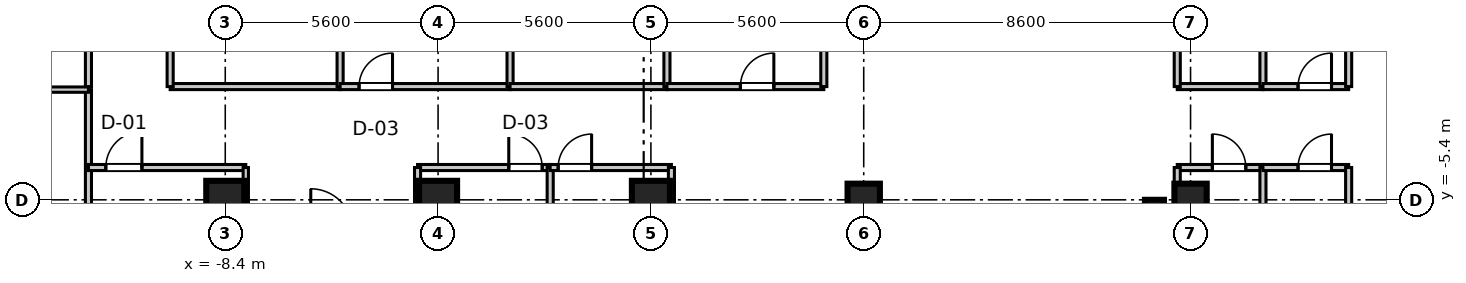
"""IFC4 building model, lengths in metres.
Left out: names, types, materials, properties, quantities, classifications, styles, units other than length and angle.
Written with IfcOpenShell. Run it as: python <this file> out.ifc"""

import sys

from ifc_helpers import new_model, si_unit, direction, frame, frame_2d, origin, origin_2d, place, context, subcontext, project, spatial, rectangle, extrude, source, transform, mapped, element, fill, save


model = new_model("IFC4")
c1 = context("Model", 3, precision=1e-05, world=origin(), true_north=direction((0.0, 1.0)))
c2 = subcontext(c1, "Body", "Model", "MODEL_VIEW")
j1 = project(units=[si_unit("LENGTHUNIT", "METRE"), si_unit("PLANEANGLEUNIT", "RADIAN")], contexts=[c1])
p1 = place(None, origin())
s1 = spatial("IfcSite", under=j1, at=p1, CompositionType="ELEMENT")
p2 = place(p1, origin())
s2 = spatial("IfcBuilding", under=s1, at=p2, CompositionType="ELEMENT")
p3 = place(p2, frame((0.0, 0.0, 241.9)))
s3 = spatial("IfcBuildingStorey", under=s2, at=p3, CompositionType="ELEMENT", Elevation=241.9)
m1 = source(origin(), c2, "Body", "SweptSolid", [
    extrude(rectangle(XDim=1.0, YDim=1.0, at=origin_2d()), origin(), (0.0, 0.0, 1.0), 3.655),
])
for number, where, z_axis, x_axis in (
    (1, (-8.4, -5.4, 0.0), (0.0, 0.0, 1.0), (1.0, 0.0, 0.0)),
    (2, (-2.8, -5.4, 0.0), (0.0, 0.0, 1.0), (1.0, 0.0, 0.0)),
    (3, (2.8, -5.4, 0.0), (0.0, 0.0, 1.0), (1.0, 0.0, 0.0)),
):
    element("IfcColumn", number, at=place(p3, frame(where, z_axis=z_axis, x_axis=x_axis)), inside=s3, PredefinedType="COLUMN", context=c2, shape_type="MappedRepresentation", body=[
        mapped(m1, transform((0.0, 0.0, 0.0), scale=1.0)),
    ])
m2 = source(origin(), c2, "Body", "SweptSolid", [
    extrude(rectangle(XDim=0.85, YDim=0.85, at=origin_2d()), origin(), (0.0, 0.0, 1.0), 3.655),
])
for number, where, z_axis, x_axis in (
    (4, (8.4, -5.4, 0.0), (0.0, 0.0, 1.0), (1.0, 0.0, 0.0)),
    (5, (17.0, -5.4, 0.0), (0.0, 0.0, 1.0), (1.0, 0.0, 0.0)),
):
    element("IfcColumn", number, at=place(p3, frame(where, z_axis=z_axis, x_axis=x_axis)), inside=s3, PredefinedType="PILASTER", context=c2, shape_type="MappedRepresentation", body=[
        mapped(m2, transform((0.0, 0.0, 0.0), scale=1.0)),
    ])
m3 = source(origin(), c2, "Body", "SweptSolid", [
    extrude(rectangle(XDim=11.6, YDim=0.5, at=frame_2d((5.8, 0.0))), origin(), (0.0, 0.0, 1.0), 3.41),
])
p4 = place(p3, frame((16.05, -17.0, 0.0), z_axis=(0.0, 0.0, 1.0), x_axis=(0.0, 1.0, 0.0)))
e6 = element("IfcWall", 6, at=p4, inside=s3, PredefinedType="SHEAR", context=c2, shape_type="MappedRepresentation", body=[
    mapped(m3, transform((0.0, 0.0, 0.0), scale=1.0)),
])
m4 = source(origin(), c2, "Body", "SweptSolid", [
    extrude(rectangle(XDim=2.255, YDim=0.16, at=frame_2d((1.127, 0.0))), origin(), (0.0, 0.0, 1.0), 2.75),
])
p5 = place(p3, frame((16.65, -4.55, 0.0), z_axis=(0.0, 0.0, 1.0), x_axis=(1.0, 0.0, 0.0)))
e7 = element("IfcWall", 7, at=p5, inside=s3, PredefinedType="PARTITIONING", context=c2, shape_type="MappedRepresentation", body=[
    mapped(m4, transform((0.0, 0.0, 0.0), scale=1.0)),
])
p6 = place(p5, frame((0.924, 0.0, 0.0)))
e8 = element("IfcOpeningElement", 8, at=p6, cuts=e7, PredefinedType="OPENING", context=c2, shape_type="SweptSolid", body=[
    extrude(rectangle(XDim=0.88, YDim=2.1, at=frame_2d((0.44, 1.05))), frame((0.0, 0.09, 0.0), z_axis=(0.0, -1.0, 0.0), x_axis=(1.0, 0.0, 0.0)), (0.0, 0.0, 1.0), 0.18),
])
m5 = source(origin(), c2, "Body", "SweptSolid", [
    extrude(rectangle(XDim=19.35, YDim=0.16, at=frame_2d((9.675, 0.0))), origin(), (0.0, 0.0, 1.0), 2.75),
])
for number, where, z_axis, x_axis in (
    (9, (16.65, -23.9, 0.0), (0.0, 0.0, 1.0), (0.0, 1.0, 0.0)),
    (10, (18.905, -23.9, 0.0), (0.0, 0.0, 1.0), (0.0, 1.0, 0.0)),
):
    element("IfcWall", number, at=place(p3, frame(where, z_axis=z_axis, x_axis=x_axis)), inside=s3, PredefinedType="PARTITIONING", context=c2, shape_type="MappedRepresentation", body=[
        mapped(m5, transform((0.0, 0.0, 0.0), scale=1.0)),
    ])
m6 = source(origin(), c2, "Body", "SweptSolid", [
    extrude(rectangle(XDim=2.255, YDim=0.16, at=frame_2d((1.127, 0.0))), origin(), (0.0, 0.0, 1.0), 2.75),
])
p7 = place(p3, frame((18.905, -4.55, 0.0), z_axis=(0.0, 0.0, 1.0), x_axis=(1.0, 0.0, 0.0)))
e11 = element("IfcWall", 11, at=p7, inside=s3, PredefinedType="PARTITIONING", context=c2, shape_type="MappedRepresentation", body=[
    mapped(m6, transform((0.0, 0.0, 0.0), scale=1.0)),
])
p8 = place(p7, frame((0.924, 0.0, 0.0)))
e12 = element("IfcOpeningElement", 12, at=p8, cuts=e11, PredefinedType="OPENING", context=c2, shape_type="SweptSolid", body=[
    extrude(rectangle(XDim=0.88, YDim=2.1, at=frame_2d((0.44, 1.05))), frame((0.0, 0.09, 0.0), z_axis=(0.0, -1.0, 0.0), x_axis=(1.0, 0.0, 0.0)), (0.0, 0.0, 1.0), 0.18),
])
m7 = source(origin(), c2, "Body", "SweptSolid", [
    extrude(rectangle(XDim=17.93, YDim=0.16, at=frame_2d((8.965, 0.0))), origin(), (0.0, 0.0, 1.0), 2.75),
])
p9 = place(p3, frame((21.16, -22.48, 0.0), z_axis=(0.0, 0.0, 1.0), x_axis=(0.0, 1.0, 0.0)))
e13 = element("IfcWall", 13, at=p9, inside=s3, PredefinedType="PARTITIONING", context=c2, shape_type="MappedRepresentation", body=[
    mapped(m7, transform((0.0, 0.0, 0.0), scale=1.0)),
])
m8 = source(origin(), c2, "Body", "SweptSolid", [
    extrude(rectangle(XDim=21.4, YDim=0.16, at=frame_2d((10.7, 0.0))), origin(), (0.0, 0.0, 1.0), 2.75),
])
p10 = place(p3, frame((-12.0, -23.9, 0.0), z_axis=(0.0, 0.0, 1.0), x_axis=(0.0, 1.0, 0.0)))
e14 = element("IfcWall", 14, at=p10, inside=s3, PredefinedType="PARTITIONING", context=c2, shape_type="MappedRepresentation", body=[
    mapped(m8, transform((0.0, 0.0, 0.0), scale=1.0)),
])
p11 = place(p10, frame((12.3, 0.0, 0.0)))
e15 = element("IfcOpeningElement", 15, at=p11, cuts=e14, PredefinedType="OPENING", context=c2, shape_type="SweptSolid", body=[
    extrude(rectangle(XDim=0.95, YDim=2.1, at=frame_2d((0.475, 1.05))), frame((0.0, 0.09, 0.0), z_axis=(0.0, -1.0, 0.0), x_axis=(1.0, 0.0, 0.0)), (0.0, 0.0, 1.0), 0.18),
])
m9 = source(origin(), c2, "Body", "SweptSolid", [
    extrude(rectangle(XDim=9.16, YDim=0.14, at=frame_2d((4.58, 0.0))), origin(), (0.0, 0.0, 1.0), 2.75),
])
p12 = place(p3, frame((-21.16, -2.5, 0.0), z_axis=(0.0, 0.0, 1.0), x_axis=(1.0, 0.0, 0.0)))
e16 = element("IfcWall", 16, at=p12, inside=s3, PredefinedType="PARTITIONING", context=c2, shape_type="MappedRepresentation", body=[
    mapped(m9, transform((0.0, 0.0, 0.0), scale=1.0)),
])
m10 = source(origin(), c2, "Body", "SweptSolid", [
    extrude(rectangle(XDim=4.14, YDim=0.16, at=frame_2d((2.07, 0.0))), origin(), (0.0, 0.0, 1.0), 2.75),
])
p13 = place(p3, frame((-12.0, -4.55, 0.0), z_axis=(0.0, 0.0, 1.0), x_axis=(1.0, 0.0, 0.0)))
e17 = element("IfcWall", 17, at=p13, inside=s3, PredefinedType="PARTITIONING", context=c2, shape_type="MappedRepresentation", body=[
    mapped(m10, transform((0.0, 0.0, 0.0), scale=1.0)),
])
p14 = place(p13, frame((0.457, 0.0, 0.0)))
e18 = element("IfcOpeningElement", 18, at=p14, cuts=e17, PredefinedType="OPENING", context=c2, shape_type="SweptSolid", body=[
    extrude(rectangle(XDim=0.95, YDim=2.1, at=frame_2d((0.475, 1.05))), frame((0.0, 0.09, 0.0), z_axis=(0.0, -1.0, 0.0), x_axis=(1.0, 0.0, 0.0)), (0.0, 0.0, 1.0), 0.18),
])
m11 = source(origin(), c2, "Body", "SweptSolid", [
    extrude(rectangle(XDim=19.35, YDim=0.14, at=frame_2d((9.675, 0.0))), origin(), (0.0, 0.0, 1.0), 2.75),
])
p15 = place(p3, frame((-7.86, -23.9, 0.0), z_axis=(0.0, 0.0, 1.0), x_axis=(0.0, 1.0, 0.0)))
e19 = element("IfcWall", 19, at=p15, inside=s3, PredefinedType="PARTITIONING", context=c2, shape_type="MappedRepresentation", body=[
    mapped(m11, transform((0.0, 0.0, 0.0), scale=1.0)),
])
m12 = source(origin(), c2, "Body", "SweptSolid", [
    extrude(rectangle(XDim=3.49, YDim=0.16, at=frame_2d((1.745, 0.0))), origin(), (0.0, 0.0, 1.0), 2.75),
])
p16 = place(p3, frame((-3.34, -4.55, 0.0), z_axis=(0.0, 0.0, 1.0), x_axis=(1.0, 0.0, 0.0)))
e20 = element("IfcWall", 20, at=p16, inside=s3, PredefinedType="PARTITIONING", context=c2, shape_type="MappedRepresentation", body=[
    mapped(m12, transform((0.0, 0.0, 0.0), scale=1.0)),
])
p17 = place(p16, frame((2.4, 0.0, 0.0)))
e21 = element("IfcOpeningElement", 21, at=p17, cuts=e20, PredefinedType="OPENING", context=c2, shape_type="SweptSolid", body=[
    extrude(rectangle(XDim=0.88, YDim=2.1, at=frame_2d((0.44, 1.05))), frame((0.0, 0.09, 0.0), z_axis=(0.0, -1.0, 0.0), x_axis=(1.0, 0.0, 0.0)), (0.0, 0.0, 1.0), 0.18),
])
for number, where, z_axis, x_axis in (
    (22, (-3.34, -23.9, 0.0), (0.0, 0.0, 1.0), (0.0, 1.0, 0.0)),
    (23, (0.15, -23.9, 0.0), (0.0, 0.0, 1.0), (0.0, 1.0, 0.0)),
):
    element("IfcWall", number, at=place(p3, frame(where, z_axis=z_axis, x_axis=x_axis)), inside=s3, PredefinedType="PARTITIONING", context=c2, shape_type="MappedRepresentation", body=[
        mapped(m5, transform((0.0, 0.0, 0.0), scale=1.0)),
    ])
m13 = source(origin(), c2, "Body", "SweptSolid", [
    extrude(rectangle(XDim=3.19, YDim=0.16, at=frame_2d((1.595, 0.0))), origin(), (0.0, 0.0, 1.0), 2.75),
])
p18 = place(p3, frame((0.15, -4.55, 0.0), z_axis=(0.0, 0.0, 1.0), x_axis=(1.0, 0.0, 0.0)))
e24 = element("IfcWall", 24, at=p18, inside=s3, PredefinedType="PARTITIONING", context=c2, shape_type="MappedRepresentation", body=[
    mapped(m13, transform((0.0, 0.0, 0.0), scale=1.0)),
])
p19 = place(p18, frame((0.21, 0.0, 0.0)))
e25 = element("IfcOpeningElement", 25, at=p19, cuts=e24, PredefinedType="OPENING", context=c2, shape_type="SweptSolid", body=[
    extrude(rectangle(XDim=0.88, YDim=2.1, at=frame_2d((0.44, 1.05))), frame((0.0, 0.09, 0.0), z_axis=(0.0, -1.0, 0.0), x_axis=(1.0, 0.0, 0.0)), (0.0, 0.0, 1.0), 0.18),
])
p20 = place(p3, frame((3.34, -23.9, 0.0), z_axis=(0.0, 0.0, 1.0), x_axis=(0.0, 1.0, 0.0)))
e26 = element("IfcWall", 26, at=p20, inside=s3, PredefinedType="PARTITIONING", context=c2, shape_type="MappedRepresentation", body=[
    mapped(m5, transform((0.0, 0.0, 0.0), scale=1.0)),
])
m14 = source(origin(), c2, "Body", "SweptSolid", [
    extrude(rectangle(XDim=4.84, YDim=0.16, at=frame_2d((2.42, 0.0))), origin(), (0.0, 0.0, 1.0), 2.75),
])
p21 = place(p3, frame((-12.0, -2.42, 0.0), z_axis=(0.0, 0.0, 1.0), x_axis=(0.0, 1.0, 0.0)))
e27 = element("IfcWall", 27, at=p21, inside=s3, PredefinedType="PARTITIONING", context=c2, shape_type="MappedRepresentation", body=[
    mapped(m14, transform((0.0, 0.0, 0.0), scale=1.0)),
])
p22 = place(p21, frame((1.945, 0.0, 0.0)))
e28 = element("IfcOpeningElement", 28, at=p22, cuts=e27, PredefinedType="OPENING", context=c2, shape_type="SweptSolid", body=[
    extrude(rectangle(XDim=0.95, YDim=2.1, at=frame_2d((0.475, 1.05))), frame((0.0, 0.09, 0.0), z_axis=(0.0, -1.0, 0.0), x_axis=(1.0, 0.0, 0.0)), (0.0, 0.0, 1.0), 0.18),
])
m15 = source(origin(), c2, "Body", "SweptSolid", [
    extrude(rectangle(XDim=4.472, YDim=0.16, at=frame_2d((2.236, 0.0))), origin(), (0.0, 0.0, 1.0), 2.75),
])
p23 = place(p3, frame((-9.85, -2.42, 0.0), z_axis=(0.0, 0.0, 1.0), x_axis=(1.0, 0.0, 0.0)))
e29 = element("IfcWall", 29, at=p23, inside=s3, PredefinedType="PARTITIONING", context=c2, shape_type="MappedRepresentation", body=[
    mapped(m15, transform((0.0, 0.0, 0.0), scale=1.0)),
])
for number, where, z_axis, x_axis in (
    (30, (-9.85, -2.42, 0.0), (0.0, 0.0, 1.0), (0.0, 1.0, 0.0)),
    (31, (-5.378, -2.42, 0.0), (0.0, 0.0, 1.0), (0.0, 1.0, 0.0)),
):
    element("IfcWall", number, at=place(p3, frame(where, z_axis=z_axis, x_axis=x_axis)), inside=s3, PredefinedType="PARTITIONING", context=c2, shape_type="MappedRepresentation", body=[
        mapped(m14, transform((0.0, 0.0, 0.0), scale=1.0)),
    ])
m16 = source(origin(), c2, "Body", "SweptSolid", [
    extrude(rectangle(XDim=4.472, YDim=0.16, at=frame_2d((2.236, 0.0))), origin(), (0.0, 0.0, 1.0), 2.75),
])
p24 = place(p3, frame((-5.378, -2.42, 0.0), z_axis=(0.0, 0.0, 1.0), x_axis=(1.0, 0.0, 0.0)))
e32 = element("IfcWall", 32, at=p24, inside=s3, PredefinedType="PARTITIONING", context=c2, shape_type="MappedRepresentation", body=[
    mapped(m16, transform((0.0, 0.0, 0.0), scale=1.0)),
])
p25 = place(p24, frame((0.499, 0.0, 0.0)))
e33 = element("IfcOpeningElement", 33, at=p25, cuts=e32, PredefinedType="OPENING", context=c2, shape_type="SweptSolid", body=[
    extrude(rectangle(XDim=0.88, YDim=2.1, at=frame_2d((0.44, 1.05))), frame((0.0, 0.09, 0.0), z_axis=(0.0, -1.0, 0.0), x_axis=(1.0, 0.0, 0.0)), (0.0, 0.0, 1.0), 0.18),
])
p26 = place(p3, frame((-0.906, -2.42, 0.0), z_axis=(0.0, 0.0, 1.0), x_axis=(0.0, 1.0, 0.0)))
e34 = element("IfcWall", 34, at=p26, inside=s3, PredefinedType="PARTITIONING", context=c2, shape_type="MappedRepresentation", body=[
    mapped(m14, transform((0.0, 0.0, 0.0), scale=1.0)),
])
m17 = source(origin(), c2, "Body", "SweptSolid", [
    extrude(rectangle(XDim=4.128, YDim=0.16, at=frame_2d((2.064, 0.0))), origin(), (0.0, 0.0, 1.0), 2.75),
])
p27 = place(p3, frame((-0.906, -2.42, 0.0), z_axis=(0.0, 0.0, 1.0), x_axis=(1.0, 0.0, 0.0)))
e35 = element("IfcWall", 35, at=p27, inside=s3, PredefinedType="PARTITIONING", context=c2, shape_type="MappedRepresentation", body=[
    mapped(m17, transform((0.0, 0.0, 0.0), scale=1.0)),
])
p28 = place(p3, frame((3.222, -2.42, 0.0), z_axis=(0.0, 0.0, 1.0), x_axis=(0.0, 1.0, 0.0)))
e36 = element("IfcWall", 36, at=p28, inside=s3, PredefinedType="PARTITIONING", context=c2, shape_type="MappedRepresentation", body=[
    mapped(m14, transform((0.0, 0.0, 0.0), scale=1.0)),
])
m18 = source(origin(), c2, "Body", "SweptSolid", [
    extrude(rectangle(XDim=4.128, YDim=0.16, at=frame_2d((2.064, 0.0))), origin(), (0.0, 0.0, 1.0), 2.75),
])
p29 = place(p3, frame((3.222, -2.42, 0.0), z_axis=(0.0, 0.0, 1.0), x_axis=(1.0, 0.0, 0.0)))
e37 = element("IfcWall", 37, at=p29, inside=s3, PredefinedType="PARTITIONING", context=c2, shape_type="MappedRepresentation", body=[
    mapped(m18, transform((0.0, 0.0, 0.0), scale=1.0)),
])
p30 = place(p29, frame((1.933, 0.0, 0.0)))
e38 = element("IfcOpeningElement", 38, at=p30, cuts=e37, PredefinedType="OPENING", context=c2, shape_type="SweptSolid", body=[
    extrude(rectangle(XDim=0.88, YDim=2.1, at=frame_2d((0.44, 1.05))), frame((0.0, 0.09, 0.0), z_axis=(0.0, -1.0, 0.0), x_axis=(1.0, 0.0, 0.0)), (0.0, 0.0, 1.0), 0.18),
])
p31 = place(p3, frame((7.35, -2.42, 0.0), z_axis=(0.0, 0.0, 1.0), x_axis=(0.0, 1.0, 0.0)))
e39 = element("IfcWall", 39, at=p31, inside=s3, PredefinedType="PARTITIONING", context=c2, shape_type="MappedRepresentation", body=[
    mapped(m14, transform((0.0, 0.0, 0.0), scale=1.0)),
])
p32 = place(p3, frame((16.65, -2.42, 0.0), z_axis=(0.0, 0.0, 1.0), x_axis=(1.0, 0.0, 0.0)))
e40 = element("IfcWall", 40, at=p32, inside=s3, PredefinedType="PARTITIONING", context=c2, shape_type="MappedRepresentation", body=[
    mapped(m4, transform((0.0, 0.0, 0.0), scale=1.0)),
])
for number, where, z_axis, x_axis in (
    (41, (16.65, -2.42, 0.0), (0.0, 0.0, 1.0), (0.0, 1.0, 0.0)),
    (42, (18.905, -2.42, 0.0), (0.0, 0.0, 1.0), (0.0, 1.0, 0.0)),
):
    element("IfcWall", number, at=place(p3, frame(where, z_axis=z_axis, x_axis=x_axis)), inside=s3, PredefinedType="PARTITIONING", context=c2, shape_type="MappedRepresentation", body=[
        mapped(m14, transform((0.0, 0.0, 0.0), scale=1.0)),
    ])
p33 = place(p3, frame((18.905, -2.42, 0.0), z_axis=(0.0, 0.0, 1.0), x_axis=(1.0, 0.0, 0.0)))
e43 = element("IfcWall", 43, at=p33, inside=s3, PredefinedType="PARTITIONING", context=c2, shape_type="MappedRepresentation", body=[
    mapped(m6, transform((0.0, 0.0, 0.0), scale=1.0)),
])
p34 = place(p33, frame((0.924, 0.0, 0.0)))
e44 = element("IfcOpeningElement", 44, at=p34, cuts=e43, PredefinedType="OPENING", context=c2, shape_type="SweptSolid", body=[
    extrude(rectangle(XDim=0.88, YDim=2.1, at=frame_2d((0.44, 1.05))), frame((0.0, 0.09, 0.0), z_axis=(0.0, -1.0, 0.0), x_axis=(1.0, 0.0, 0.0)), (0.0, 0.0, 1.0), 0.18),
])
p35 = place(p3, frame((21.16, -2.42, 0.0), z_axis=(0.0, 0.0, 1.0), x_axis=(0.0, 1.0, 0.0)))
e45 = element("IfcWall", 45, at=p35, inside=s3, PredefinedType="PARTITIONING", context=c2, shape_type="MappedRepresentation", body=[
    mapped(m14, transform((0.0, 0.0, 0.0), scale=1.0)),
])
m19 = source(origin(), c2, "Body", "SweptSolid", [
    extrude(rectangle(XDim=0.88, YDim=2.1, at=frame_2d((0.44, 1.05))), frame((0.0, 0.025, 0.0), z_axis=(0.0, -1.0, 0.0), x_axis=(1.0, 0.0, 0.0)), (0.0, 0.0, 1.0), 0.05),
])
p36 = place(p6, frame((0.88, 0.0, 0.0), z_axis=(0.0, 0.0, 1.0), x_axis=(-1.0, 0.0, 0.0)))
e46 = element("IfcDoor", 46, at=p36, inside=s3, OperationType="SINGLE_SWING_LEFT", PredefinedType="DOOR", context=c2, shape_type="MappedRepresentation", body=[
    mapped(m19, transform((0.0, 0.0, 0.0), scale=1.0)),
])
fill(e8, e46)
p37 = place(p8, frame((0.88, 0.0, 0.0), z_axis=(0.0, 0.0, 1.0), x_axis=(-1.0, 0.0, 0.0)))
e47 = element("IfcDoor", 47, at=p37, inside=s3, OperationType="SINGLE_SWING_RIGHT", PredefinedType="DOOR", context=c2, shape_type="MappedRepresentation", body=[
    mapped(m19, transform((0.0, 0.0, 0.0), scale=1.0)),
])
fill(e12, e47)
m20 = source(origin(), c2, "Body", "SweptSolid", [
    extrude(rectangle(XDim=0.95, YDim=2.1, at=frame_2d((0.475, 1.05))), frame((0.0, 0.025, 0.0), z_axis=(0.0, -1.0, 0.0), x_axis=(1.0, 0.0, 0.0)), (0.0, 0.0, 1.0), 0.05),
])
p38 = place(p14, frame((0.95, 0.0, 0.0), z_axis=(0.0, 0.0, 1.0), x_axis=(-1.0, 0.0, 0.0)))
e48 = element("IfcDoor", 48, at=p38, inside=s3, OperationType="SINGLE_SWING_RIGHT", PredefinedType="DOOR", context=c2, shape_type="MappedRepresentation", body=[
    mapped(m20, transform((0.0, 0.0, 0.0), scale=1.0)),
])
fill(e18, e48)
p39 = place(p17, frame((0.88, 0.0, 0.0), z_axis=(0.0, 0.0, 1.0), x_axis=(-1.0, 0.0, 0.0)))
e49 = element("IfcDoor", 49, at=p39, inside=s3, OperationType="SINGLE_SWING_LEFT", PredefinedType="DOOR", context=c2, shape_type="MappedRepresentation", body=[
    mapped(m19, transform((0.0, 0.0, 0.0), scale=1.0)),
])
fill(e21, e49)
p40 = place(p19, frame((0.88, 0.0, 0.0), z_axis=(0.0, 0.0, 1.0), x_axis=(-1.0, 0.0, 0.0)))
e50 = element("IfcDoor", 50, at=p40, inside=s3, OperationType="SINGLE_SWING_RIGHT", PredefinedType="DOOR", context=c2, shape_type="MappedRepresentation", body=[
    mapped(m19, transform((0.0, 0.0, 0.0), scale=1.0)),
])
fill(e25, e50)
p41 = place(p25, origin())
e51 = element("IfcDoor", 51, at=p41, inside=s3, OperationType="SINGLE_SWING_RIGHT", PredefinedType="DOOR", context=c2, shape_type="MappedRepresentation", body=[
    mapped(m19, transform((0.0, 0.0, 0.0), scale=1.0)),
])
fill(e33, e51)
p42 = place(p30, origin())
e52 = element("IfcDoor", 52, at=p42, inside=s3, OperationType="SINGLE_SWING_RIGHT", PredefinedType="DOOR", context=c2, shape_type="MappedRepresentation", body=[
    mapped(m19, transform((0.0, 0.0, 0.0), scale=1.0)),
])
fill(e38, e52)
p43 = place(p34, origin())
e53 = element("IfcDoor", 53, at=p43, inside=s3, OperationType="SINGLE_SWING_RIGHT", PredefinedType="DOOR", context=c2, shape_type="MappedRepresentation", body=[
    mapped(m19, transform((0.0, 0.0, 0.0), scale=1.0)),
])
fill(e44, e53)
save(model, sys.argv[1])
